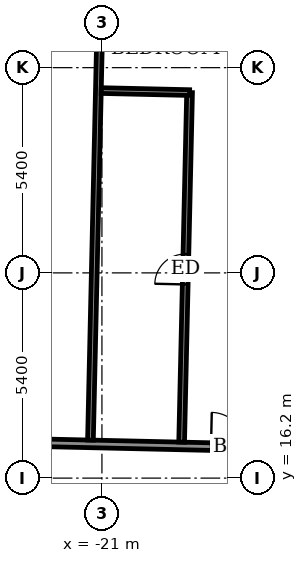
"""IFC4 building model, lengths in metres.
Left out: names, types, materials, properties, quantities, classifications, styles, units other than length and angle.
Written with IfcOpenShell. Run it as: python <this file> out.ifc"""

import sys

from ifc_helpers import new_model, si_unit, direction, frame, frame_2d, origin, place, context, subcontext, project, spatial, rectangle, extrude, element, fill, save


model = new_model("IFC4")
c1 = context("Model", 3, precision=1e-05, world=origin(), true_north=direction((0.0, 1.0)))
c2 = subcontext(c1, "Body", "Model", "MODEL_VIEW")
j1 = project(units=[si_unit("LENGTHUNIT", "METRE"), si_unit("PLANEANGLEUNIT", "RADIAN")], contexts=[c1])
p1 = place(None, origin())
s1 = spatial("IfcSite", under=j1, at=p1, CompositionType="ELEMENT")
p2 = place(p1, origin())
s2 = spatial("IfcBuilding", under=s1, at=p2, CompositionType="ELEMENT")
p3 = place(p2, frame((0.0, 0.0, 309.7)))
s3 = spatial("IfcBuildingStorey", under=s2, at=p3, CompositionType="ELEMENT", Elevation=309.7)
p4 = place(p3, frame((-30.652, 17.313, 0.0), z_axis=(0.0, 0.0, 1.0), x_axis=(0.999742623764, -0.02268669719, 0.0)))
e1 = element("IfcWall", 1, at=p4, inside=s3, PredefinedType="PARTITIONING", context=c2, shape_type="SweptSolid", body=[
    extrude(rectangle(XDim=58.8, YDim=0.2, at=frame_2d((29.4, 0.0))), origin(), (0.0, 0.0, 1.0), 3.05),
])
p5 = place(p4, frame((54.601, 0.0, 0.0)))
e2 = element("IfcOpeningElement", 2, at=p5, cuts=e1, PredefinedType="OPENING", context=c2, shape_type="SweptSolid", body=[
    extrude(rectangle(XDim=1.0, YDim=2.1, at=frame_2d((0.5, 1.05))), frame((0.0, 0.11, 0.0), z_axis=(0.0, -1.0, 0.0), x_axis=(1.0, 0.0, 0.0)), (0.0, 0.0, 1.0), 0.22),
])
p6 = place(p4, frame((49.35, 0.0, 0.0)))
e3 = element("IfcOpeningElement", 3, at=p6, cuts=e1, PredefinedType="OPENING", context=c2, shape_type="SweptSolid", body=[
    extrude(rectangle(XDim=0.9, YDim=2.1, at=frame_2d((0.45, 1.05))), frame((0.0, 0.11, 0.0), z_axis=(0.0, -1.0, 0.0), x_axis=(1.0, 0.0, 0.0)), (0.0, 0.0, 1.0), 0.22),
])
p7 = place(p4, frame((42.55, 0.0, 0.0)))
e4 = element("IfcOpeningElement", 4, at=p7, cuts=e1, PredefinedType="OPENING", context=c2, shape_type="SweptSolid", body=[
    extrude(rectangle(XDim=0.9, YDim=2.1, at=frame_2d((0.45, 1.05))), frame((0.0, 0.11, 0.0), z_axis=(0.0, -1.0, 0.0), x_axis=(1.0, 0.0, 0.0)), (0.0, 0.0, 1.0), 0.22),
])
p8 = place(p4, frame((40.475, 0.0, 0.0)))
e5 = element("IfcOpeningElement", 5, at=p8, cuts=e1, PredefinedType="OPENING", context=c2, shape_type="SweptSolid", body=[
    extrude(rectangle(XDim=0.9, YDim=2.1, at=frame_2d((0.45, 1.05))), frame((0.0, 0.11, 0.0), z_axis=(0.0, -1.0, 0.0), x_axis=(1.0, 0.0, 0.0)), (0.0, 0.0, 1.0), 0.22),
])
p9 = place(p4, frame((33.6, 0.0, 0.0)))
e6 = element("IfcOpeningElement", 6, at=p9, cuts=e1, PredefinedType="OPENING", context=c2, shape_type="SweptSolid", body=[
    extrude(rectangle(XDim=0.9, YDim=2.1, at=frame_2d((0.45, 1.05))), frame((0.0, 0.11, 0.0), z_axis=(0.0, -1.0, 0.0), x_axis=(1.0, 0.0, 0.0)), (0.0, 0.0, 1.0), 0.22),
])
p10 = place(p4, frame((31.55, 0.0, 0.0)))
e7 = element("IfcOpeningElement", 7, at=p10, cuts=e1, PredefinedType="OPENING", context=c2, shape_type="SweptSolid", body=[
    extrude(rectangle(XDim=0.9, YDim=2.1, at=frame_2d((0.45, 1.05))), frame((0.0, 0.11, 0.0), z_axis=(0.0, -1.0, 0.0), x_axis=(1.0, 0.0, 0.0)), (0.0, 0.0, 1.0), 0.22),
])
p11 = place(p4, frame((24.425, 0.0, 0.0)))
e8 = element("IfcOpeningElement", 8, at=p11, cuts=e1, PredefinedType="OPENING", context=c2, shape_type="SweptSolid", body=[
    extrude(rectangle(XDim=0.9, YDim=2.1, at=frame_2d((0.45, 1.05))), frame((0.0, 0.11, 0.0), z_axis=(0.0, -1.0, 0.0), x_axis=(1.0, 0.0, 0.0)), (0.0, 0.0, 1.0), 0.22),
])
p12 = place(p4, frame((22.05, 0.0, 0.0)))
e9 = element("IfcOpeningElement", 9, at=p12, cuts=e1, PredefinedType="OPENING", context=c2, shape_type="SweptSolid", body=[
    extrude(rectangle(XDim=0.9, YDim=2.1, at=frame_2d((0.45, 1.05))), frame((0.0, 0.11, 0.0), z_axis=(0.0, -1.0, 0.0), x_axis=(1.0, 0.0, 0.0)), (0.0, 0.0, 1.0), 0.22),
])
p13 = place(p4, frame((14.95, 0.0, 0.0)))
e10 = element("IfcOpeningElement", 10, at=p13, cuts=e1, PredefinedType="OPENING", context=c2, shape_type="SweptSolid", body=[
    extrude(rectangle(XDim=0.9, YDim=2.1, at=frame_2d((0.45, 1.05))), frame((0.0, 0.11, 0.0), z_axis=(0.0, -1.0, 0.0), x_axis=(1.0, 0.0, 0.0)), (0.0, 0.0, 1.0), 0.22),
])
p14 = place(p4, frame((12.525, 0.0, 0.0)))
e11 = element("IfcOpeningElement", 11, at=p14, cuts=e1, PredefinedType="OPENING", context=c2, shape_type="SweptSolid", body=[
    extrude(rectangle(XDim=0.9, YDim=2.1, at=frame_2d((0.45, 1.05))), frame((0.0, 0.11, 0.0), z_axis=(0.0, -1.0, 0.0), x_axis=(1.0, 0.0, 0.0)), (0.0, 0.0, 1.0), 0.22),
])
p15 = place(p4, frame((4.032, 0.0, 0.0)))
e12 = element("IfcOpeningElement", 12, at=p15, cuts=e1, PredefinedType="OPENING", context=c2, shape_type="SweptSolid", body=[
    extrude(rectangle(XDim=1.0, YDim=2.1, at=frame_2d((0.5, 1.05))), frame((0.0, 0.11, 0.0), z_axis=(0.0, -1.0, 0.0), x_axis=(1.0, 0.0, 0.0)), (0.0, 0.0, 1.0), 0.22),
])
p16 = place(p3, frame((-21.302, 17.201, 0.0), z_axis=(0.0, 0.0, 1.0), x_axis=(0.022637991173, 0.99974372784, 0.0)))
e13 = element("IfcWall", 13, at=p16, inside=s3, PredefinedType="PARTITIONING", context=c2, shape_type="SweptSolid", body=[
    extrude(rectangle(XDim=12.1, YDim=0.15, at=frame_2d((6.05, 0.0))), origin(), (0.0, 0.0, 1.0), 2.5),
])
p17 = place(p3, frame((-18.903, 17.147, 0.0), z_axis=(0.0, 0.0, 1.0), x_axis=(0.022717185456, 0.999741931443, 0.0)))
e14 = element("IfcWall", 14, at=p17, inside=s3, PredefinedType="PARTITIONING", context=c2, shape_type="SweptSolid", body=[
    extrude(rectangle(XDim=9.199, YDim=0.15, at=frame_2d((4.6, 0.0))), origin(), (0.0, 0.0, 1.0), 3.05),
])
p18 = place(p17, frame((4.15, 0.0, 0.0)))
e15 = element("IfcOpeningElement", 15, at=p18, cuts=e14, PredefinedType="OPENING", context=c2, shape_type="SweptSolid", body=[
    extrude(rectangle(XDim=0.8, YDim=2.1, at=frame_2d((0.4, 1.05))), frame((0.0, 0.085, 0.0), z_axis=(0.0, -1.0, 0.0), x_axis=(1.0, 0.0, 0.0)), (0.0, 0.0, 1.0), 0.17),
])
p19 = place(p3, frame((-21.019, 26.397, 0.0), z_axis=(0.0, 0.0, 1.0), x_axis=(0.999740478815, -0.022781023197, 0.0)))
e16 = element("IfcWall", 16, at=p19, inside=s3, PredefinedType="PARTITIONING", context=c2, shape_type="SweptSolid", body=[
    extrude(rectangle(XDim=2.325, YDim=0.15, at=frame_2d((1.163, 0.0))), origin(), (0.0, 0.0, 1.0), 3.05),
])
p20 = place(p14, origin())
e17 = element("IfcDoor", 17, at=p20, inside=s3, OperationType="SINGLE_SWING_LEFT", PredefinedType="DOOR", context=c2, shape_type="SweptSolid", body=[
    extrude(rectangle(XDim=0.9, YDim=2.1, at=frame_2d((0.45, 1.05))), frame((0.0, 0.025, 0.0), z_axis=(0.0, -1.0, 0.0), x_axis=(1.0, 0.0, 0.0)), (0.0, 0.0, 1.0), 0.05),
])
fill(e11, e17)
p21 = place(p18, origin())
e18 = element("IfcDoor", 18, at=p21, inside=s3, OperationType="SINGLE_SWING_LEFT", PredefinedType="DOOR", context=c2, shape_type="SweptSolid", body=[
    extrude(rectangle(XDim=0.8, YDim=2.1, at=frame_2d((0.4, 1.05))), frame((0.0, 0.025, 0.0), z_axis=(0.0, -1.0, 0.0), x_axis=(1.0, 0.0, 0.0)), (0.0, 0.0, 1.0), 0.05),
])
fill(e15, e18)
save(model, sys.argv[1])
